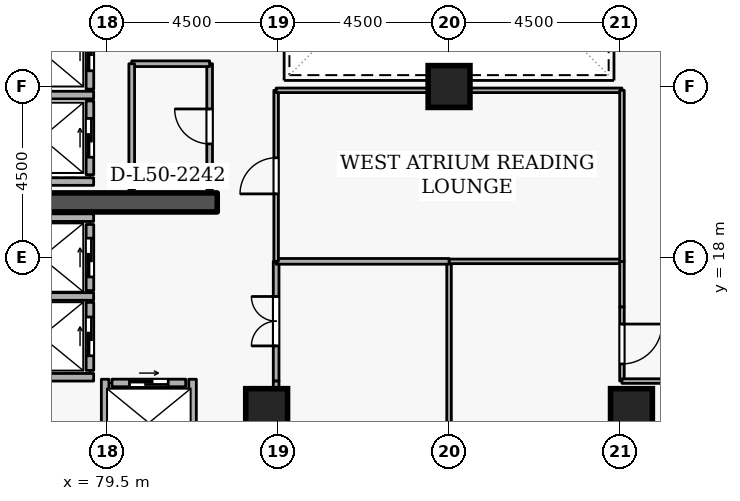
"""IFC4 building model, lengths in metres.
Left out: names, types, materials, properties, quantities, classifications, styles, units other than length and angle.
Written with IfcOpenShell. Run it as: python <this file> out.ifc"""

import sys

from ifc_helpers import new_model, si_unit, direction, frame, frame_2d, origin, origin_2d, place, context, subcontext, project, spatial, rectangle, extrude, element, fill, save


model = new_model("IFC4")
c1 = context("Model", 3, precision=1e-05, world=origin(), true_north=direction((0.0, 1.0)))
c2 = subcontext(c1, "Body", "Model", "MODEL_VIEW")
j1 = project(units=[si_unit("LENGTHUNIT", "METRE"), si_unit("PLANEANGLEUNIT", "RADIAN")], contexts=[c1])
p1 = place(None, origin())
s1 = spatial("IfcSite", under=j1, at=p1, CompositionType="ELEMENT")
p2 = place(p1, origin())
s2 = spatial("IfcBuilding", under=s1, at=p2, CompositionType="ELEMENT")
p3 = place(p2, frame((0.0, 0.0, 189.3)))
s3 = spatial("IfcBuildingStorey", under=s2, at=p3, CompositionType="ELEMENT", Elevation=189.3)
p4 = place(p3, frame((76.6, 19.45, 0.0), z_axis=(0.0, 0.0, 1.0), x_axis=(1.0, 0.0, 0.0)))
e1 = element("IfcWall", 1, at=p4, inside=s3, PredefinedType="SHEAR", context=c2, shape_type="SweptSolid", body=[
    extrude(rectangle(XDim=5.8, YDim=0.5, at=frame_2d((2.9, 0.0))), origin(), (0.0, 0.0, 1.0), 3.6),
])
for number, where, z_axis, x_axis in (
    (2, (93.3, 14.0, 0.0), (0.0, 0.0, 1.0), (1.0, 0.0, 0.0)),
    (3, (83.7, 14.0, 0.0), (0.0, 0.0, 1.0), (1.0, 0.0, 0.0)),
    (4, (88.5, 22.5, 0.0), (0.0, 0.0, 1.0), (1.0, 0.0, 0.0)),
):
    element("IfcColumn", number, at=place(p3, frame(where, z_axis=z_axis, x_axis=x_axis)), inside=s3, PredefinedType="COLUMN", context=c2, shape_type="SweptSolid", body=[
        extrude(rectangle(XDim=1.1, YDim=1.1, at=origin_2d()), origin(), (0.0, 0.0, 1.0), 3.6),
    ])
p5 = place(p3, frame((79.05, 22.43, 0.0), z_axis=(0.0, 0.0, 1.0), x_axis=(0.0, 1.0, 0.0)))
e5 = element("IfcWall", 5, at=p5, inside=s3, PredefinedType="STANDARD", context=c2, shape_type="SweptSolid", body=[
    extrude(rectangle(XDim=1.99, YDim=0.2, at=frame_2d((0.995, 0.0))), origin(), (0.0, 0.0, 1.0), 3.34),
])
p6 = place(p5, frame((0.485, 0.0, 0.0)))
e6 = element("IfcOpeningElement", 6, at=p6, cuts=e5, PredefinedType="OPENING", context=c2, shape_type="SweptSolid", body=[
    extrude(rectangle(XDim=1.02, YDim=2.06, at=frame_2d((0.51, 1.03))), frame((0.0, 0.11, 0.0), z_axis=(0.0, -1.0, 0.0), x_axis=(1.0, 0.0, 0.0)), (0.0, 0.0, 1.0), 0.22),
])
p7 = place(p3, frame((79.05, 20.18, 0.0), z_axis=(0.0, 0.0, 1.0), x_axis=(0.0, 1.0, 0.0)))
e7 = element("IfcWall", 7, at=p7, inside=s3, PredefinedType="STANDARD", context=c2, shape_type="SweptSolid", body=[
    extrude(rectangle(XDim=1.94, YDim=0.2, at=frame_2d((0.97, 0.0))), origin(), (0.0, 0.0, 1.0), 3.34),
])
p8 = place(p7, frame((0.46, 0.0, 0.0)))
e8 = element("IfcOpeningElement", 8, at=p8, cuts=e7, PredefinedType="OPENING", context=c2, shape_type="SweptSolid", body=[
    extrude(rectangle(XDim=1.02, YDim=2.06, at=frame_2d((0.51, 1.03))), frame((0.0, 0.11, 0.0), z_axis=(0.0, -1.0, 0.0), x_axis=(1.0, 0.0, 0.0)), (0.0, 0.0, 1.0), 0.22),
])
p9 = place(p3, frame((79.05, 17.13, 0.0), z_axis=(0.0, 0.0, 1.0), x_axis=(0.0, 1.0, 0.0)))
e9 = element("IfcWall", 9, at=p9, inside=s3, PredefinedType="STANDARD", context=c2, shape_type="SweptSolid", body=[
    extrude(rectangle(XDim=1.74, YDim=0.2, at=frame_2d((0.87, 0.0))), origin(), (0.0, 0.0, 1.0), 3.34),
])
p10 = place(p9, frame((0.36, 0.0, 0.0)))
e10 = element("IfcOpeningElement", 10, at=p10, cuts=e9, PredefinedType="OPENING", context=c2, shape_type="SweptSolid", body=[
    extrude(rectangle(XDim=1.02, YDim=2.06, at=frame_2d((0.51, 1.03))), frame((0.0, 0.11, 0.0), z_axis=(0.0, -1.0, 0.0), x_axis=(1.0, 0.0, 0.0)), (0.0, 0.0, 1.0), 0.22),
])
p11 = place(p3, frame((79.05, 15.03, 0.0), z_axis=(0.0, 0.0, 1.0), x_axis=(0.0, 1.0, 0.0)))
e11 = element("IfcWall", 11, at=p11, inside=s3, PredefinedType="STANDARD", context=c2, shape_type="SweptSolid", body=[
    extrude(rectangle(XDim=1.79, YDim=0.2, at=frame_2d((0.895, 0.0))), origin(), (0.0, 0.0, 1.0), 3.34),
])
p12 = place(p11, frame((0.385, 0.0, 0.0)))
e12 = element("IfcOpeningElement", 12, at=p12, cuts=e11, PredefinedType="OPENING", context=c2, shape_type="SweptSolid", body=[
    extrude(rectangle(XDim=1.02, YDim=2.06, at=frame_2d((0.51, 1.03))), frame((0.0, 0.11, 0.0), z_axis=(0.0, -1.0, 0.0), x_axis=(1.0, 0.0, 0.0)), (0.0, 0.0, 1.0), 0.22),
])
p13 = place(p3, frame((79.63, 14.7, 0.0), z_axis=(0.0, 0.0, 1.0), x_axis=(1.0, 0.0, 0.0)))
e13 = element("IfcWall", 13, at=p13, inside=s3, PredefinedType="STANDARD", context=c2, shape_type="SweptSolid", body=[
    extrude(rectangle(XDim=1.94, YDim=0.2, at=frame_2d((0.97, 0.0))), origin(), (0.0, 0.0, 1.0), 3.34),
])
p14 = place(p13, frame((0.46, 0.0, 0.0)))
e14 = element("IfcOpeningElement", 14, at=p14, cuts=e13, PredefinedType="OPENING", context=c2, shape_type="SweptSolid", body=[
    extrude(rectangle(XDim=1.02, YDim=2.06, at=frame_2d((0.51, 1.03))), frame((0.0, 0.11, 0.0), z_axis=(0.0, -1.0, 0.0), x_axis=(1.0, 0.0, 0.0)), (0.0, 0.0, 1.0), 0.22),
])
for number, where, z_axis, x_axis in (
    (15, (76.612, 22.275, 0.0), (0.0, 0.0, 1.0), (1.0, 0.0, 0.0)),
    (16, (76.612, 20.0, 0.0), (0.0, 0.0, 1.0), (1.0, 0.0, 0.0)),
):
    element("IfcWall", number, at=place(p3, frame(where, z_axis=z_axis, x_axis=x_axis)), inside=s3, PredefinedType="STANDARD", context=c2, shape_type="SweptSolid", body=[
        extrude(rectangle(XDim=2.536, YDim=0.2, at=frame_2d((1.268, 0.0))), origin(), (0.0, 0.0, 1.0), 3.34),
    ])
p15 = place(p3, frame((76.402, 19.05, 0.0), z_axis=(0.0, 0.0, 1.0), x_axis=(1.0, 0.0, 0.0)))
e17 = element("IfcWall", 17, at=p15, inside=s3, PredefinedType="STANDARD", context=c2, shape_type="SweptSolid", body=[
    extrude(rectangle(XDim=2.746, YDim=0.2, at=frame_2d((1.373, 0.0))), origin(), (0.0, 0.0, 1.0), 2.545),
])
p16 = place(p3, frame((76.402, 16.975, 0.0), z_axis=(0.0, 0.0, 1.0), x_axis=(1.0, 0.0, 0.0)))
e18 = element("IfcWall", 18, at=p16, inside=s3, PredefinedType="STANDARD", context=c2, shape_type="SweptSolid", body=[
    extrude(rectangle(XDim=2.746, YDim=0.2, at=frame_2d((1.373, 0.0))), origin(), (0.0, 0.0, 1.0), 3.34),
])
p17 = place(p3, frame((76.512, 14.85, 0.0), z_axis=(0.0, 0.0, 1.0), x_axis=(1.0, 0.0, 0.0)))
e19 = element("IfcWall", 19, at=p17, inside=s3, PredefinedType="STANDARD", context=c2, shape_type="SweptSolid", body=[
    extrude(rectangle(XDim=2.636, YDim=0.2, at=frame_2d((1.318, 0.0))), origin(), (0.0, 0.0, 1.0), 3.34),
])
for number, where, z_axis, x_axis in (
    (20, (81.75, 12.612, 0.0), (0.0, 0.0, 1.0), (0.0, 1.0, 0.0)),
    (21, (79.45, 12.612, 0.0), (0.0, 0.0, 1.0), (0.0, 1.0, 0.0)),
):
    element("IfcWall", number, at=place(p3, frame(where, z_axis=z_axis, x_axis=x_axis)), inside=s3, PredefinedType="STANDARD", context=c2, shape_type="SweptSolid", body=[
        extrude(rectangle(XDim=2.186, YDim=0.2, at=frame_2d((1.093, 0.0))), origin(), (0.0, 0.0, 1.0), 3.34),
    ])
p18 = place(p3, frame((82.2, 19.8, 0.0), z_axis=(0.0, 0.0, 1.0), x_axis=(0.0, 1.0, 0.0)))
e22 = element("IfcWall", 22, at=p18, inside=s3, PredefinedType="PARTITIONING", context=c2, shape_type="SweptSolid", body=[
    extrude(rectangle(XDim=3.3, YDim=0.15, at=frame_2d((1.65, 0.0))), origin(), (0.0, 0.0, 1.0), 3.34),
])
p19 = place(p18, frame((1.19, 0.0, 0.0)))
e23 = element("IfcOpeningElement", 23, at=p19, cuts=e22, PredefinedType="OPENING", context=c2, shape_type="SweptSolid", body=[
    extrude(rectangle(XDim=0.92, YDim=2.08, at=frame_2d((0.46, 1.04))), frame((0.0, 0.085, 0.0), z_axis=(0.0, -1.0, 0.0), x_axis=(1.0, 0.0, 0.0)), (0.0, 0.0, 1.0), 0.17),
])
p20 = place(p3, frame((82.2, 23.1, 0.0), z_axis=(0.0, 0.0, 1.0), x_axis=(-1.0, 0.0, 0.0)))
e24 = element("IfcWall", 24, at=p20, inside=s3, PredefinedType="PARTITIONING", context=c2, shape_type="SweptSolid", body=[
    extrude(rectangle(XDim=2.05, YDim=0.15, at=frame_2d((1.025, 0.0))), origin(), (0.0, 0.0, 1.0), 3.34),
])
p21 = place(p3, frame((80.15, 23.1, 0.0), z_axis=(0.0, 0.0, 1.0), x_axis=(0.0, -1.0, 0.0)))
e25 = element("IfcWall", 25, at=p21, inside=s3, PredefinedType="PARTITIONING", context=c2, shape_type="SweptSolid", body=[
    extrude(rectangle(XDim=3.3, YDim=0.15, at=frame_2d((1.65, 0.0))), origin(), (0.0, 0.0, 1.0), 3.34),
])
p22 = place(p3, frame((88.5, 9.28, 0.0), z_axis=(0.0, 0.0, 1.0), x_axis=(0.0, 1.0, 0.0)))
e26 = element("IfcWall", 26, at=p22, inside=s3, PredefinedType="PARTITIONING", context=c2, shape_type="SweptSolid", body=[
    extrude(rectangle(XDim=8.62, YDim=0.12, at=frame_2d((4.31, 0.0))), origin(), (0.0, 0.0, 1.0), 2.878),
])
p23 = place(p3, frame((88.5, 17.9, 0.0), z_axis=(0.0, 0.0, 1.0), x_axis=(1.0, 0.0, 0.0)))
e27 = element("IfcWall", 27, at=p23, inside=s3, PredefinedType="PARTITIONING", context=c2, shape_type="SweptSolid", body=[
    extrude(rectangle(XDim=4.55, YDim=0.12, at=frame_2d((2.275, 0.0))), origin(), (0.0, 0.0, 1.0), 3.34),
])
p24 = place(p3, frame((93.05, 17.9, 0.0), z_axis=(0.0, 0.0, 1.0), x_axis=(0.0, -1.0, 0.0)))
e28 = element("IfcWall", 28, at=p24, inside=s3, PredefinedType="PARTITIONING", context=c2, shape_type="SweptSolid", body=[
    extrude(rectangle(XDim=1.2, YDim=0.12, at=frame_2d((0.6, 0.0))), origin(), (0.0, 0.0, 1.0), 3.34),
])
p25 = place(p3, frame((93.05, 16.7, 0.0), z_axis=(0.0, 0.0, 1.0), x_axis=(0.0, -1.0, 0.0)))
e29 = element("IfcWall", 29, at=p25, inside=s3, PredefinedType="PARTITIONING", context=c2, shape_type="SweptSolid", body=[
    extrude(rectangle(XDim=1.95, YDim=0.12, at=frame_2d((0.975, 0.0))), origin(), (0.0, 0.0, 1.0), 3.34),
])
p26 = place(p25, frame((0.45, 0.0, 0.0)))
e30 = element("IfcOpeningElement", 30, at=p26, cuts=e29, PredefinedType="OPENING", context=c2, shape_type="SweptSolid", body=[
    extrude(rectangle(XDim=1.05, YDim=2.1, at=frame_2d((0.525, 1.05))), frame((0.0, 0.07, 0.0), z_axis=(0.0, -1.0, 0.0), x_axis=(1.0, 0.0, 0.0)), (0.0, 0.0, 1.0), 0.14),
])
p27 = place(p3, frame((93.05, 14.75, 0.0), z_axis=(0.0, 0.0, 1.0), x_axis=(1.0, 0.0, 0.0)))
e31 = element("IfcWall", 31, at=p27, inside=s3, PredefinedType="PARTITIONING", context=c2, shape_type="SweptSolid", body=[
    extrude(rectangle(XDim=1.75, YDim=0.12, at=frame_2d((0.875, 0.0))), origin(), (0.0, 0.0, 1.0), 3.34),
])
p28 = place(p3, frame((83.95, 14.75, 0.0), z_axis=(0.0, 0.0, 1.0), x_axis=(0.0, 1.0, 0.0)))
e32 = element("IfcWall", 32, at=p28, inside=s3, PredefinedType="PARTITIONING", context=c2, shape_type="SweptSolid", body=[
    extrude(rectangle(XDim=3.15, YDim=0.15, at=frame_2d((1.575, 0.0))), origin(), (0.0, 0.0, 1.0), 3.34),
])
p29 = place(p28, frame((0.925, 0.0, 0.0)))
e33 = element("IfcOpeningElement", 33, at=p29, cuts=e32, PredefinedType="OPENING", context=c2, shape_type="SweptSolid", body=[
    extrude(rectangle(XDim=1.3, YDim=2.12, at=frame_2d((0.65, 1.06))), frame((0.0, 0.085, 0.0), z_axis=(0.0, -1.0, 0.0), x_axis=(1.0, 0.0, 0.0)), (0.0, 0.0, 1.0), 0.17),
])
p30 = place(p3, frame((83.95, 17.9, 0.0), z_axis=(0.0, 0.0, 1.0), x_axis=(1.0, 0.0, 0.0)))
e34 = element("IfcWall", 34, at=p30, inside=s3, PredefinedType="PARTITIONING", context=c2, shape_type="SweptSolid", body=[
    extrude(rectangle(XDim=4.55, YDim=0.15, at=frame_2d((2.275, 0.0))), origin(), (0.0, 0.0, 1.0), 3.34),
])
p31 = place(p3, frame((83.95, 12.4, 0.0), z_axis=(0.0, 0.0, 1.0), x_axis=(0.0, 1.0, 0.0)))
e35 = element("IfcWall", 35, at=p31, inside=s3, PredefinedType="PARTITIONING", context=c2, shape_type="SweptSolid", body=[
    extrude(rectangle(XDim=2.35, YDim=0.15, at=frame_2d((1.175, 0.0))), origin(), (0.0, 0.0, 1.0), 3.34),
])
p32 = place(p3, frame((83.95, 17.9, 0.0), z_axis=(0.0, 0.0, 1.0), x_axis=(0.0, 1.0, 0.0)))
e36 = element("IfcWall", 36, at=p32, inside=s3, PredefinedType="PARTITIONING", context=c2, shape_type="SweptSolid", body=[
    extrude(rectangle(XDim=4.5, YDim=0.12, at=frame_2d((2.25, 0.0))), origin(), (0.0, 0.0, 1.0), 3.34),
])
p33 = place(p32, frame((1.775, 0.0, 0.0)))
e37 = element("IfcOpeningElement", 37, at=p33, cuts=e36, PredefinedType="OPENING", context=c2, shape_type="SweptSolid", body=[
    extrude(rectangle(XDim=0.95, YDim=2.1, at=frame_2d((0.475, 1.05))), frame((0.0, 0.07, 0.0), z_axis=(0.0, -1.0, 0.0), x_axis=(1.0, 0.0, 0.0)), (0.0, 0.0, 1.0), 0.14),
])
p34 = place(p3, frame((83.95, 22.4, 0.0), z_axis=(0.0, 0.0, 1.0), x_axis=(1.0, 0.0, 0.0)))
e38 = element("IfcWall", 38, at=p34, inside=s3, PredefinedType="PARTITIONING", context=c2, shape_type="SweptSolid", body=[
    extrude(rectangle(XDim=9.1, YDim=0.12, at=frame_2d((4.55, 0.0))), origin(), (0.0, 0.0, 1.0), 3.34),
])
p35 = place(p3, frame((93.05, 22.4, 0.0), z_axis=(0.0, 0.0, 1.0), x_axis=(0.0, -1.0, 0.0)))
e39 = element("IfcWall", 39, at=p35, inside=s3, PredefinedType="PARTITIONING", context=c2, shape_type="SweptSolid", body=[
    extrude(rectangle(XDim=4.5, YDim=0.12, at=frame_2d((2.25, 0.0))), origin(), (0.0, 0.0, 1.0), 3.34),
])
p36 = place(p6, origin())
e40 = element("IfcDoor", 40, at=p36, inside=s3, OperationType="SLIDING_TO_LEFT", PredefinedType="DOOR", context=c2, shape_type="SweptSolid", body=[
    extrude(rectangle(XDim=1.02, YDim=2.06, at=frame_2d((0.51, 1.03))), frame((0.0, 0.025, 0.0), z_axis=(0.0, -1.0, 0.0), x_axis=(1.0, 0.0, 0.0)), (0.0, 0.0, 1.0), 0.05),
])
fill(e6, e40)
p37 = place(p8, origin())
e41 = element("IfcDoor", 41, at=p37, inside=s3, OperationType="SLIDING_TO_LEFT", PredefinedType="DOOR", context=c2, shape_type="SweptSolid", body=[
    extrude(rectangle(XDim=1.02, YDim=2.06, at=frame_2d((0.51, 1.03))), frame((0.0, 0.025, 0.0), z_axis=(0.0, -1.0, 0.0), x_axis=(1.0, 0.0, 0.0)), (0.0, 0.0, 1.0), 0.05),
])
fill(e8, e41)
p38 = place(p10, origin())
e42 = element("IfcDoor", 42, at=p38, inside=s3, OperationType="SLIDING_TO_LEFT", PredefinedType="DOOR", context=c2, shape_type="SweptSolid", body=[
    extrude(rectangle(XDim=1.02, YDim=2.06, at=frame_2d((0.51, 1.03))), frame((0.0, 0.025, 0.0), z_axis=(0.0, -1.0, 0.0), x_axis=(1.0, 0.0, 0.0)), (0.0, 0.0, 1.0), 0.05),
])
fill(e10, e42)
p39 = place(p12, origin())
e43 = element("IfcDoor", 43, at=p39, inside=s3, OperationType="SLIDING_TO_LEFT", PredefinedType="DOOR", context=c2, shape_type="SweptSolid", body=[
    extrude(rectangle(XDim=1.02, YDim=2.06, at=frame_2d((0.51, 1.03))), frame((0.0, 0.025, 0.0), z_axis=(0.0, -1.0, 0.0), x_axis=(1.0, 0.0, 0.0)), (0.0, 0.0, 1.0), 0.05),
])
fill(e12, e43)
p40 = place(p14, origin())
e44 = element("IfcDoor", 44, at=p40, inside=s3, OperationType="SLIDING_TO_LEFT", PredefinedType="DOOR", context=c2, shape_type="SweptSolid", body=[
    extrude(rectangle(XDim=1.02, YDim=2.06, at=frame_2d((0.51, 1.03))), frame((0.0, 0.025, 0.0), z_axis=(0.0, -1.0, 0.0), x_axis=(1.0, 0.0, 0.0)), (0.0, 0.0, 1.0), 0.05),
])
fill(e14, e44)
p41 = place(p19, origin())
e45 = element("IfcDoor", 45, at=p41, inside=s3, OperationType="SINGLE_SWING_RIGHT", PredefinedType="DOOR", context=c2, shape_type="SweptSolid", body=[
    extrude(rectangle(XDim=0.92, YDim=2.08, at=frame_2d((0.46, 1.04))), frame((0.0, 0.025, 0.0), z_axis=(0.0, -1.0, 0.0), x_axis=(1.0, 0.0, 0.0)), (0.0, 0.0, 1.0), 0.05),
])
fill(e23, e45)
p42 = place(p26, origin())
e46 = element("IfcDoor", 46, at=p42, inside=s3, OperationType="SINGLE_SWING_LEFT", PredefinedType="DOOR", context=c2, shape_type="SweptSolid", body=[
    extrude(rectangle(XDim=1.05, YDim=2.1, at=frame_2d((0.525, 1.05))), frame((0.0, 0.025, 0.0), z_axis=(0.0, -1.0, 0.0), x_axis=(1.0, 0.0, 0.0)), (0.0, 0.0, 1.0), 0.05),
])
fill(e30, e46)
p43 = place(p29, origin())
e47 = element("IfcDoor", 47, at=p43, inside=s3, OperationType="DOUBLE_DOOR_SINGLE_SWING", PredefinedType="DOOR", context=c2, shape_type="SweptSolid", body=[
    extrude(rectangle(XDim=1.3, YDim=2.12, at=frame_2d((0.65, 1.06))), frame((0.0, 0.025, 0.0), z_axis=(0.0, -1.0, 0.0), x_axis=(1.0, 0.0, 0.0)), (0.0, 0.0, 1.0), 0.05),
])
fill(e33, e47)
p44 = place(p33, origin())
e48 = element("IfcDoor", 48, at=p44, inside=s3, OperationType="SINGLE_SWING_LEFT", PredefinedType="DOOR", context=c2, shape_type="SweptSolid", body=[
    extrude(rectangle(XDim=0.95, YDim=2.1, at=frame_2d((0.475, 1.05))), frame((0.0, 0.025, 0.0), z_axis=(0.0, -1.0, 0.0), x_axis=(1.0, 0.0, 0.0)), (0.0, 0.0, 1.0), 0.05),
])
fill(e37, e48)
save(model, sys.argv[1])
